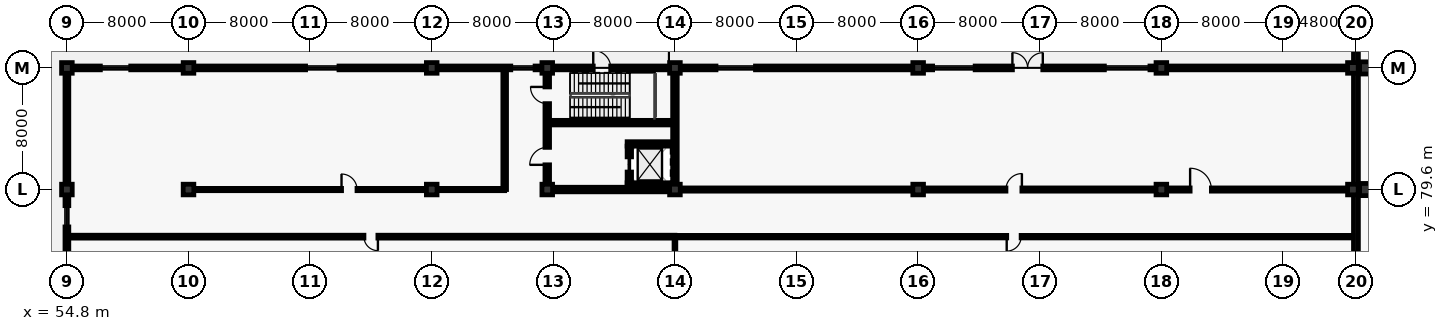
"""IFC4 building model, lengths in metres.
Left out: names, types, materials, properties, quantities, classifications, styles, units other than length and angle.
Written with IfcOpenShell. Run it as: python <this file> out.ifc"""

import sys

from ifc_helpers import new_model, si_unit, direction, frame, frame_2d, origin, origin_2d, place, context, subcontext, project, spatial, rectangle, extrude, element, fill, save


model = new_model("IFC4")
c1 = context("Model", 3, precision=1e-05, world=origin(), true_north=direction((0.0, 1.0)))
c2 = subcontext(c1, "Body", "Model", "MODEL_VIEW")
j1 = project(units=[si_unit("LENGTHUNIT", "METRE"), si_unit("PLANEANGLEUNIT", "RADIAN")], contexts=[c1])
p1 = place(None, origin())
s1 = spatial("IfcSite", under=j1, at=p1, CompositionType="ELEMENT")
p2 = place(p1, origin())
s2 = spatial("IfcBuilding", under=s1, at=p2, CompositionType="ELEMENT")
p3 = place(p2, origin())
s3 = spatial("IfcBuildingStorey", under=s2, at=p3, CompositionType="ELEMENT", Elevation=0.0)
for number, where, z_axis, x_axis in (
    (1, (54.8, 79.6, 0.0), (0.0, 0.0, 1.0), (1.0, 0.0, 0.0)),
    (2, (54.8, 87.6, 0.0), (0.0, 0.0, 1.0), (1.0, 0.0, 0.0)),
    (3, (62.8, 79.6, 0.0), (0.0, 0.0, 1.0), (1.0, 0.0, 0.0)),
    (4, (62.8, 87.6, 0.0), (0.0, 0.0, 1.0), (1.0, 0.0, 0.0)),
    (5, (78.8, 79.6, 0.0), (0.0, 0.0, 1.0), (1.0, 0.0, 0.0)),
    (6, (78.8, 87.6, 0.0), (0.0, 0.0, 1.0), (1.0, 0.0, 0.0)),
    (7, (86.4, 79.6, 0.0), (0.0, 0.0, 1.0), (1.0, 0.0, 0.0)),
    (8, (86.4, 87.6, 0.0), (0.0, 0.0, 1.0), (1.0, 0.0, 0.0)),
    (9, (94.8, 79.6, 0.0), (0.0, 0.0, 1.0), (1.0, 0.0, 0.0)),
    (10, (94.8, 87.6, 0.0), (0.0, 0.0, 1.0), (1.0, 0.0, 0.0)),
    (11, (110.8, 79.6, 0.0), (0.0, 0.0, 1.0), (1.0, 0.0, 0.0)),
    (12, (110.8, 87.6, 0.0), (0.0, 0.0, 1.0), (1.0, 0.0, 0.0)),
    (13, (126.8, 79.6, 0.0), (0.0, 0.0, 1.0), (1.0, 0.0, 0.0)),
    (14, (126.8, 87.6, 0.0), (0.0, 0.0, 1.0), (1.0, 0.0, 0.0)),
    (15, (139.4, 79.6, 0.0), (0.0, 0.0, 1.0), (1.0, 0.0, 0.0)),
    (16, (139.4, 87.6, 0.0), (0.0, 0.0, 1.0), (1.0, 0.0, 0.0)),
):
    element("IfcColumn", number, at=place(p3, frame(where, z_axis=z_axis, x_axis=x_axis)), inside=s3, PredefinedType="COLUMN", context=c2, shape_type="SweptSolid", body=[
        extrude(rectangle(XDim=0.7, YDim=0.7, at=origin_2d()), origin(), (0.0, 0.0, 1.0), 5.4),
    ])
for number, where, z_axis, x_axis in (
    (17, (140.24, 79.6, 0.0), (0.0, 0.0, 1.0), (1.0, 0.0, 0.0)),
    (18, (140.24, 87.6, 0.0), (0.0, 0.0, 1.0), (1.0, 0.0, 0.0)),
):
    element("IfcColumn", number, at=place(p3, frame(where, z_axis=z_axis, x_axis=x_axis)), inside=s3, PredefinedType="COLUMN", context=c2, shape_type="SweptSolid", body=[
        extrude(rectangle(XDim=0.8, YDim=0.8, at=origin_2d()), origin(), (0.0, 0.0, 1.0), 5.4),
    ])
p4 = place(p3, frame((54.8, 87.6, 0.0), z_axis=(0.0, 0.0, 1.0), x_axis=(1.0, 0.0, 0.0)))
e19 = element("IfcWall", 19, at=p4, inside=s3, PredefinedType="SOLIDWALL", context=c2, shape_type="SweptSolid", body=[
    extrude(rectangle(XDim=84.6, YDim=0.25, at=frame_2d((42.3, 0.0))), origin(), (0.0, 0.0, 1.0), 4.29),
])
p5 = place(p4, frame((34.625, 0.0, 0.0)))
e20 = element("IfcOpeningElement", 20, at=p5, cuts=e19, PredefinedType="OPENING", context=c2, shape_type="SweptSolid", body=[
    extrude(rectangle(XDim=1.15, YDim=2.2, at=frame_2d((0.575, 1.1))), frame((0.0, 0.135, 0.0), z_axis=(0.0, -1.0, 0.0), x_axis=(1.0, 0.0, 0.0)), (0.0, 0.0, 1.0), 0.27),
])
p6 = place(p4, frame((62.2, 0.0, 0.0)))
e21 = element("IfcOpeningElement", 21, at=p6, cuts=e19, PredefinedType="OPENING", context=c2, shape_type="SweptSolid", body=[
    extrude(rectangle(XDim=2.0, YDim=2.5, at=frame_2d((1.0, 1.25))), frame((0.0, 0.135, 0.0), z_axis=(0.0, -1.0, 0.0), x_axis=(1.0, 0.0, 0.0)), (0.0, 0.0, 1.0), 0.27),
])
p7 = place(p4, frame((2.2, 0.0, 0.9)))
e22 = element("IfcOpeningElement", 22, at=p7, cuts=e19, PredefinedType="OPENING", context=c2, shape_type="SweptSolid", body=[
    extrude(rectangle(XDim=2.0, YDim=1.7, at=frame_2d((1.0, 0.85))), frame((0.0, 0.135, 0.0), z_axis=(0.0, -1.0, 0.0), x_axis=(1.0, 0.0, 0.0)), (0.0, 0.0, 1.0), 0.27),
])
p8 = place(p4, frame((15.7, 0.0, 0.9)))
e23 = element("IfcOpeningElement", 23, at=p8, cuts=e19, PredefinedType="OPENING", context=c2, shape_type="SweptSolid", body=[
    extrude(rectangle(XDim=2.2, YDim=1.7, at=frame_2d((1.1, 0.85))), frame((0.0, 0.135, 0.0), z_axis=(0.0, -1.0, 0.0), x_axis=(1.0, 0.0, 0.0)), (0.0, 0.0, 1.0), 0.27),
])
p9 = place(p4, frame((29.2, 0.0, 0.9)))
e24 = element("IfcOpeningElement", 24, at=p9, cuts=e19, PredefinedType="OPENING", context=c2, shape_type="SweptSolid", body=[
    extrude(rectangle(XDim=1.6, YDim=1.65, at=frame_2d((0.8, 0.825))), frame((0.0, 0.135, 0.0), z_axis=(0.0, -1.0, 0.0), x_axis=(1.0, 0.0, 0.0)), (0.0, 0.0, 1.0), 0.27),
])
p10 = place(p4, frame((42.7, 0.0, 0.9)))
e25 = element("IfcOpeningElement", 25, at=p10, cuts=e19, PredefinedType="OPENING", context=c2, shape_type="SweptSolid", body=[
    extrude(rectangle(XDim=2.6, YDim=1.75, at=frame_2d((1.3, 0.875))), frame((0.0, 0.135, 0.0), z_axis=(0.0, -1.0, 0.0), x_axis=(1.0, 0.0, 0.0)), (0.0, 0.0, 1.0), 0.27),
])
p11 = place(p4, frame((56.95, 0.0, 0.9)))
e26 = element("IfcOpeningElement", 26, at=p11, cuts=e19, PredefinedType="OPENING", context=c2, shape_type="SweptSolid", body=[
    extrude(rectangle(XDim=2.8, YDim=1.8, at=frame_2d((1.4, 0.9))), frame((0.0, 0.135, 0.0), z_axis=(0.0, -1.0, 0.0), x_axis=(1.0, 0.0, 0.0)), (0.0, 0.0, 1.0), 0.27),
])
p12 = place(p4, frame((68.25, 0.0, 0.9)))
e27 = element("IfcOpeningElement", 27, at=p12, cuts=e19, PredefinedType="OPENING", context=c2, shape_type="SweptSolid", body=[
    extrude(rectangle(XDim=3.0, YDim=1.8, at=frame_2d((1.5, 0.9))), frame((0.0, 0.135, 0.0), z_axis=(0.0, -1.0, 0.0), x_axis=(1.0, 0.0, 0.0)), (0.0, 0.0, 1.0), 0.27),
])
p13 = place(p3, frame((54.8, 74.94, 0.0), z_axis=(0.0, 0.0, 1.0), x_axis=(0.0, 1.0, 0.0)))
e28 = element("IfcWall", 28, at=p13, inside=s3, PredefinedType="SOLIDWALL", context=c2, shape_type="SweptSolid", body=[
    extrude(rectangle(XDim=12.52, YDim=0.25, at=frame_2d((6.26, 0.0))), origin(), (0.0, 0.0, 1.0), 4.29),
])
p14 = place(p13, frame((2.2, 0.0, 0.8)))
e29 = element("IfcOpeningElement", 29, at=p14, cuts=e28, PredefinedType="OPENING", context=c2, shape_type="SweptSolid", body=[
    extrude(rectangle(XDim=1.4, YDim=2.1, at=frame_2d((0.7, 1.05))), frame((0.0, 0.135, 0.0), z_axis=(0.0, -1.0, 0.0), x_axis=(1.0, 0.0, 0.0)), (0.0, 0.0, 1.0), 0.27),
])
p15 = place(p3, frame((139.6, 71.74, 0.0), z_axis=(0.0, 0.0, 1.0), x_axis=(0.0, 1.0, 0.0)))
e30 = element("IfcWall", 30, at=p15, inside=s3, PredefinedType="SOLIDWALL", context=c2, shape_type="SweptSolid", body=[
    extrude(rectangle(XDim=46.12, YDim=0.32, at=frame_2d((23.06, 0.0))), origin(), (0.0, 0.0, 1.0), 4.29),
])
p16 = place(p15, frame((31.38, 0.0, 0.0)))
e31 = element("IfcOpeningElement", 31, at=p16, cuts=e30, PredefinedType="OPENING", context=c2, shape_type="SweptSolid", body=[
    extrude(rectangle(XDim=1.4, YDim=2.25, at=frame_2d((0.7, 1.125))), frame((0.0, 0.17, 0.0), z_axis=(0.0, -1.0, 0.0), x_axis=(1.0, 0.0, 0.0)), (0.0, 0.0, 1.0), 0.34),
])
p17 = place(p3, frame((86.752, 79.6, 0.0), z_axis=(0.0, 0.0, 1.0), x_axis=(1.0, 0.0, 0.0)))
e32 = element("IfcWall", 32, at=p17, inside=s3, PredefinedType="SHEAR", context=c2, shape_type="SweptSolid", body=[
    extrude(rectangle(XDim=7.696, YDim=0.3, at=frame_2d((3.848, 0.0))), origin(), (0.0, 0.0, 1.0), 5.14),
])
p18 = place(p3, frame((86.4, 79.952, 0.0), z_axis=(0.0, 0.0, 1.0), x_axis=(0.0, 1.0, 0.0)))
e33 = element("IfcWall", 33, at=p18, inside=s3, PredefinedType="SHEAR", context=c2, shape_type="SweptSolid", body=[
    extrude(rectangle(XDim=7.296, YDim=0.3, at=frame_2d((3.648, 0.0))), origin(), (0.0, 0.0, 1.0), 5.14),
])
p19 = place(p18, frame((5.298, 0.0, 0.0)))
e34 = element("IfcOpeningElement", 34, at=p19, cuts=e33, PredefinedType="OPENING", context=c2, shape_type="SweptSolid", body=[
    extrude(rectangle(XDim=1.1, YDim=2.15, at=frame_2d((0.55, 1.075))), frame((0.0, 0.16, 0.0), z_axis=(0.0, -1.0, 0.0), x_axis=(1.0, 0.0, 0.0)), (0.0, 0.0, 1.0), 0.32),
])
p20 = place(p18, frame((1.273, 0.0, 0.0)))
e35 = element("IfcOpeningElement", 35, at=p20, cuts=e33, PredefinedType="OPENING", context=c2, shape_type="SweptSolid", body=[
    extrude(rectangle(XDim=1.15, YDim=2.2, at=frame_2d((0.575, 1.1))), frame((0.0, 0.16, 0.0), z_axis=(0.0, -1.0, 0.0), x_axis=(1.0, 0.0, 0.0)), (0.0, 0.0, 1.0), 0.32),
])
p21 = place(p3, frame((94.8, 79.952, 0.0), z_axis=(0.0, 0.0, 1.0), x_axis=(0.0, 1.0, 0.0)))
e36 = element("IfcWall", 36, at=p21, inside=s3, PredefinedType="SHEAR", context=c2, shape_type="SweptSolid", body=[
    extrude(rectangle(XDim=7.296, YDim=0.3, at=frame_2d((3.648, 0.0))), origin(), (0.0, 0.0, 1.0), 5.14),
])
p22 = place(p3, frame((86.55, 84.0, 0.0), z_axis=(0.0, 0.0, 1.0), x_axis=(1.0, 0.0, 0.0)))
e37 = element("IfcWall", 37, at=p22, inside=s3, PredefinedType="SHEAR", context=c2, shape_type="SweptSolid", body=[
    extrude(rectangle(XDim=8.1, YDim=0.3, at=frame_2d((4.05, 0.0))), origin(), (0.0, 0.0, 1.0), 5.14),
])
p23 = place(p3, frame((91.655, 79.9, 0.0), z_axis=(0.0, 0.0, 1.0), x_axis=(1.0, 0.0, 0.0)))
e38 = element("IfcWall", 38, at=p23, inside=s3, PredefinedType="SHEAR", context=c2, shape_type="SweptSolid", body=[
    extrude(rectangle(XDim=2.793, YDim=0.29, at=frame_2d((1.396, 0.0))), origin(), (0.0, 0.0, 1.0), 5.14),
])
p24 = place(p3, frame((91.655, 82.6, 0.0), z_axis=(0.0, 0.0, 1.0), x_axis=(1.0, 0.0, 0.0)))
e39 = element("IfcWall", 39, at=p24, inside=s3, PredefinedType="SHEAR", context=c2, shape_type="SweptSolid", body=[
    extrude(rectangle(XDim=2.99, YDim=0.29, at=frame_2d((1.495, 0.0))), origin(), (0.0, 0.0, 1.0), 5.14),
])
p25 = place(p3, frame((91.8, 80.045, 0.0), z_axis=(0.0, 0.0, 1.0), x_axis=(0.0, 1.0, 0.0)))
e40 = element("IfcWall", 40, at=p25, inside=s3, PredefinedType="SHEAR", context=c2, shape_type="SweptSolid", body=[
    extrude(rectangle(XDim=2.41, YDim=0.29, at=frame_2d((1.205, 0.0))), origin(), (0.0, 0.0, 1.0), 5.14),
])
p26 = place(p25, frame((0.705, 0.0, 0.0)))
e41 = element("IfcOpeningElement", 41, at=p26, cuts=e40, PredefinedType="OPENING", context=c2, shape_type="SweptSolid", body=[
    extrude(rectangle(XDim=1.0, YDim=2.15, at=frame_2d((0.5, 1.075))), frame((0.0, 0.155, 0.0), z_axis=(0.0, -1.0, 0.0), x_axis=(1.0, 0.0, 0.0)), (0.0, 0.0, 1.0), 0.31),
])
p27 = place(p3, frame((94.8, 76.5, 0.0), z_axis=(0.0, 0.0, 1.0), x_axis=(-1.0, 0.0, 0.0)))
e42 = element("IfcWall", 42, at=p27, inside=s3, PredefinedType="PARTITIONING", context=c2, shape_type="SweptSolid", body=[
    extrude(rectangle(XDim=40.0, YDim=0.19, at=frame_2d((20.0, 0.0))), origin(), (0.0, 0.0, 1.0), 5.14),
])
p28 = place(p27, frame((19.54, 0.0, 0.0)))
e43 = element("IfcOpeningElement", 43, at=p28, cuts=e42, PredefinedType="OPENING", context=c2, shape_type="SweptSolid", body=[
    extrude(rectangle(XDim=0.92, YDim=2.1, at=frame_2d((0.46, 1.05))), frame((0.0, 0.105, 0.0), z_axis=(0.0, -1.0, 0.0), x_axis=(1.0, 0.0, 0.0)), (0.0, 0.0, 1.0), 0.21),
])
p29 = place(p3, frame((139.4, 76.5, 0.0), z_axis=(0.0, 0.0, 1.0), x_axis=(-1.0, 0.0, 0.0)))
e44 = element("IfcWall", 44, at=p29, inside=s3, PredefinedType="PARTITIONING", context=c2, shape_type="SweptSolid", body=[
    extrude(rectangle(XDim=44.6, YDim=0.165, at=frame_2d((22.3, 0.0))), origin(), (0.0, 0.0, 1.0), 5.14),
])
p30 = place(p29, frame((21.825, 0.0, 0.0)))
e45 = element("IfcOpeningElement", 45, at=p30, cuts=e44, PredefinedType="OPENING", context=c2, shape_type="SweptSolid", body=[
    extrude(rectangle(XDim=0.95, YDim=2.1, at=frame_2d((0.475, 1.05))), frame((0.0, 0.093, 0.0), z_axis=(0.0, -1.0, 0.0), x_axis=(1.0, 0.0, 0.0)), (0.0, 0.0, 1.0), 0.185),
])
p31 = place(p3, frame((63.152, 79.6, 0.0), z_axis=(0.0, 0.0, 1.0), x_axis=(1.0, 0.0, 0.0)))
e46 = element("IfcWall", 46, at=p31, inside=s3, PredefinedType="PARTITIONING", context=c2, shape_type="SweptSolid", body=[
    extrude(rectangle(XDim=20.448, YDim=0.15, at=frame_2d((10.224, 0.0))), origin(), (0.0, 0.0, 1.0), 4.29),
])
p32 = place(p31, frame((9.714, 0.0, 0.0)))
e47 = element("IfcOpeningElement", 47, at=p32, cuts=e46, PredefinedType="OPENING", context=c2, shape_type="SweptSolid", body=[
    extrude(rectangle(XDim=1.02, YDim=2.1, at=frame_2d((0.51, 1.05))), frame((0.0, 0.085, 0.0), z_axis=(0.0, -1.0, 0.0), x_axis=(1.0, 0.0, 0.0)), (0.0, 0.0, 1.0), 0.17),
])
p33 = place(p3, frame((83.6, 79.6, 0.0), z_axis=(0.0, 0.0, 1.0), x_axis=(0.0, 1.0, 0.0)))
e48 = element("IfcWall", 48, at=p33, inside=s3, PredefinedType="PARTITIONING", context=c2, shape_type="SweptSolid", body=[
    extrude(rectangle(XDim=8.0, YDim=0.24, at=frame_2d((4.0, 0.0))), origin(), (0.0, 0.0, 1.0), 5.14),
])
p34 = place(p3, frame((95.152, 79.6, 0.0), z_axis=(0.0, 0.0, 1.0), x_axis=(1.0, 0.0, 0.0)))
e49 = element("IfcWall", 49, at=p34, inside=s3, PredefinedType="PARTITIONING", context=c2, shape_type="SweptSolid", body=[
    extrude(rectangle(XDim=43.896, YDim=0.21, at=frame_2d((21.948, 0.0))), origin(), (0.0, 0.0, 1.0), 4.29),
])
p35 = place(p34, frame((21.423, 0.0, 0.0)))
e50 = element("IfcOpeningElement", 50, at=p35, cuts=e49, PredefinedType="OPENING", context=c2, shape_type="SweptSolid", body=[
    extrude(rectangle(XDim=1.05, YDim=2.15, at=frame_2d((0.525, 1.075))), frame((0.0, 0.115, 0.0), z_axis=(0.0, -1.0, 0.0), x_axis=(1.0, 0.0, 0.0)), (0.0, 0.0, 1.0), 0.23),
])
p36 = place(p34, frame((33.539, 0.0, 0.0)))
e51 = element("IfcOpeningElement", 51, at=p36, cuts=e49, PredefinedType="OPENING", context=c2, shape_type="SweptSolid", body=[
    extrude(rectangle(XDim=1.4, YDim=2.25, at=frame_2d((0.7, 1.125))), frame((0.0, 0.115, 0.0), z_axis=(0.0, -1.0, 0.0), x_axis=(1.0, 0.0, 0.0)), (0.0, 0.0, 1.0), 0.23),
])
p37 = place(p3, frame((94.8, 76.5, 0.0), z_axis=(0.0, 0.0, 1.0), x_axis=(0.0, -1.0, 0.0)))
e52 = element("IfcWall", 52, at=p37, inside=s3, PredefinedType="PARTITIONING", context=c2, shape_type="SweptSolid", body=[
    extrude(rectangle(XDim=1.348, YDim=0.115, at=frame_2d((0.674, 0.0))), origin(), (0.0, 0.0, 1.0), 4.39),
])
p38 = place(p5, origin())
e53 = element("IfcDoor", 53, at=p38, inside=s3, OperationType="SINGLE_SWING_LEFT", PredefinedType="DOOR", context=c2, shape_type="SweptSolid", body=[
    extrude(rectangle(XDim=1.15, YDim=2.2, at=frame_2d((0.575, 1.1))), frame((0.0, 0.025, 0.0), z_axis=(0.0, -1.0, 0.0), x_axis=(1.0, 0.0, 0.0)), (0.0, 0.0, 1.0), 0.05),
])
fill(e20, e53)
p39 = place(p6, origin())
e54 = element("IfcDoor", 54, at=p39, inside=s3, OperationType="DOUBLE_SWING_LEFT", PredefinedType="DOOR", context=c2, shape_type="SweptSolid", body=[
    extrude(rectangle(XDim=2.0, YDim=2.5, at=frame_2d((1.0, 1.25))), frame((0.0, 0.025, 0.0), z_axis=(0.0, -1.0, 0.0), x_axis=(1.0, 0.0, 0.0)), (0.0, 0.0, 1.0), 0.05),
])
fill(e21, e54)
p40 = place(p7, origin())
e55 = element("IfcWindow", 55, at=p40, inside=s3, PartitioningType="SINGLE_PANEL", PredefinedType="WINDOW", context=c2, shape_type="SweptSolid", body=[
    extrude(rectangle(XDim=2.0, YDim=1.7, at=frame_2d((1.0, 0.85))), frame((0.0, 0.03, 0.0), z_axis=(0.0, -1.0, 0.0), x_axis=(1.0, 0.0, 0.0)), (0.0, 0.0, 1.0), 0.06),
])
fill(e22, e55)
p41 = place(p8, origin())
e56 = element("IfcWindow", 56, at=p41, inside=s3, PartitioningType="SINGLE_PANEL", PredefinedType="WINDOW", context=c2, shape_type="SweptSolid", body=[
    extrude(rectangle(XDim=2.2, YDim=1.7, at=frame_2d((1.1, 0.85))), frame((0.0, 0.03, 0.0), z_axis=(0.0, -1.0, 0.0), x_axis=(1.0, 0.0, 0.0)), (0.0, 0.0, 1.0), 0.06),
])
fill(e23, e56)
p42 = place(p9, origin())
e57 = element("IfcWindow", 57, at=p42, inside=s3, PartitioningType="SINGLE_PANEL", PredefinedType="WINDOW", context=c2, shape_type="SweptSolid", body=[
    extrude(rectangle(XDim=1.6, YDim=1.65, at=frame_2d((0.8, 0.825))), frame((0.0, 0.03, 0.0), z_axis=(0.0, -1.0, 0.0), x_axis=(1.0, 0.0, 0.0)), (0.0, 0.0, 1.0), 0.06),
])
fill(e24, e57)
p43 = place(p10, origin())
e58 = element("IfcWindow", 58, at=p43, inside=s3, PartitioningType="SINGLE_PANEL", PredefinedType="WINDOW", context=c2, shape_type="SweptSolid", body=[
    extrude(rectangle(XDim=2.6, YDim=1.75, at=frame_2d((1.3, 0.875))), frame((0.0, 0.03, 0.0), z_axis=(0.0, -1.0, 0.0), x_axis=(1.0, 0.0, 0.0)), (0.0, 0.0, 1.0), 0.06),
])
fill(e25, e58)
p44 = place(p11, origin())
e59 = element("IfcWindow", 59, at=p44, inside=s3, PartitioningType="SINGLE_PANEL", PredefinedType="WINDOW", context=c2, shape_type="SweptSolid", body=[
    extrude(rectangle(XDim=2.8, YDim=1.8, at=frame_2d((1.4, 0.9))), frame((0.0, 0.03, 0.0), z_axis=(0.0, -1.0, 0.0), x_axis=(1.0, 0.0, 0.0)), (0.0, 0.0, 1.0), 0.06),
])
fill(e26, e59)
p45 = place(p12, origin())
e60 = element("IfcWindow", 60, at=p45, inside=s3, PartitioningType="SINGLE_PANEL", PredefinedType="WINDOW", context=c2, shape_type="SweptSolid", body=[
    extrude(rectangle(XDim=3.0, YDim=1.8, at=frame_2d((1.5, 0.9))), frame((0.0, 0.03, 0.0), z_axis=(0.0, -1.0, 0.0), x_axis=(1.0, 0.0, 0.0)), (0.0, 0.0, 1.0), 0.06),
])
fill(e27, e60)
p46 = place(p14, origin())
e61 = element("IfcWindow", 61, at=p46, inside=s3, PartitioningType="SINGLE_PANEL", PredefinedType="WINDOW", context=c2, shape_type="SweptSolid", body=[
    extrude(rectangle(XDim=1.4, YDim=2.1, at=frame_2d((0.7, 1.05))), frame((0.0, 0.03, 0.0), z_axis=(0.0, -1.0, 0.0), x_axis=(1.0, 0.0, 0.0)), (0.0, 0.0, 1.0), 0.06),
])
fill(e29, e61)
p47 = place(p19, origin())
e62 = element("IfcDoor", 62, at=p47, inside=s3, OperationType="SINGLE_SWING_RIGHT", PredefinedType="DOOR", context=c2, shape_type="SweptSolid", body=[
    extrude(rectangle(XDim=1.1, YDim=2.15, at=frame_2d((0.55, 1.075))), frame((0.0, 0.025, 0.0), z_axis=(0.0, -1.0, 0.0), x_axis=(1.0, 0.0, 0.0)), (0.0, 0.0, 1.0), 0.05),
])
fill(e34, e62)
p48 = place(p20, origin())
e63 = element("IfcDoor", 63, at=p48, inside=s3, OperationType="SINGLE_SWING_LEFT", PredefinedType="DOOR", context=c2, shape_type="SweptSolid", body=[
    extrude(rectangle(XDim=1.15, YDim=2.2, at=frame_2d((0.575, 1.1))), frame((0.0, 0.025, 0.0), z_axis=(0.0, -1.0, 0.0), x_axis=(1.0, 0.0, 0.0)), (0.0, 0.0, 1.0), 0.05),
])
fill(e35, e63)
p49 = place(p26, origin())
e64 = element("IfcDoor", 64, at=p49, inside=s3, OperationType="SLIDING_TO_LEFT", PredefinedType="DOOR", context=c2, shape_type="SweptSolid", body=[
    extrude(rectangle(XDim=1.0, YDim=2.15, at=frame_2d((0.5, 1.075))), frame((0.0, 0.025, 0.0), z_axis=(0.0, -1.0, 0.0), x_axis=(1.0, 0.0, 0.0)), (0.0, 0.0, 1.0), 0.05),
])
fill(e41, e64)
p50 = place(p28, origin())
e65 = element("IfcDoor", 65, at=p50, inside=s3, OperationType="SINGLE_SWING_LEFT", PredefinedType="DOOR", context=c2, shape_type="SweptSolid", body=[
    extrude(rectangle(XDim=0.92, YDim=2.1, at=frame_2d((0.46, 1.05))), frame((0.0, 0.025, 0.0), z_axis=(0.0, -1.0, 0.0), x_axis=(1.0, 0.0, 0.0)), (0.0, 0.0, 1.0), 0.05),
])
fill(e43, e65)
p51 = place(p30, origin())
e66 = element("IfcDoor", 66, at=p51, inside=s3, OperationType="SINGLE_SWING_RIGHT", PredefinedType="DOOR", context=c2, shape_type="SweptSolid", body=[
    extrude(rectangle(XDim=0.95, YDim=2.1, at=frame_2d((0.475, 1.05))), frame((0.0, 0.025, 0.0), z_axis=(0.0, -1.0, 0.0), x_axis=(1.0, 0.0, 0.0)), (0.0, 0.0, 1.0), 0.05),
])
fill(e45, e66)
p52 = place(p32, origin())
e67 = element("IfcDoor", 67, at=p52, inside=s3, OperationType="SINGLE_SWING_LEFT", PredefinedType="DOOR", context=c2, shape_type="SweptSolid", body=[
    extrude(rectangle(XDim=1.02, YDim=2.1, at=frame_2d((0.51, 1.05))), frame((0.0, 0.025, 0.0), z_axis=(0.0, -1.0, 0.0), x_axis=(1.0, 0.0, 0.0)), (0.0, 0.0, 1.0), 0.05),
])
fill(e47, e67)
p53 = place(p35, origin())
e68 = element("IfcDoor", 68, at=p53, inside=s3, OperationType="SINGLE_SWING_RIGHT", PredefinedType="DOOR", context=c2, shape_type="SweptSolid", body=[
    extrude(rectangle(XDim=1.05, YDim=2.15, at=frame_2d((0.525, 1.075))), frame((0.0, 0.025, 0.0), z_axis=(0.0, -1.0, 0.0), x_axis=(1.0, 0.0, 0.0)), (0.0, 0.0, 1.0), 0.05),
])
fill(e50, e68)
p54 = place(p36, origin())
e69 = element("IfcDoor", 69, at=p54, inside=s3, OperationType="SINGLE_SWING_LEFT", PredefinedType="DOOR", context=c2, shape_type="SweptSolid", body=[
    extrude(rectangle(XDim=1.4, YDim=2.25, at=frame_2d((0.7, 1.125))), frame((0.0, 0.025, 0.0), z_axis=(0.0, -1.0, 0.0), x_axis=(1.0, 0.0, 0.0)), (0.0, 0.0, 1.0), 0.05),
])
fill(e51, e69)
save(model, sys.argv[1])
